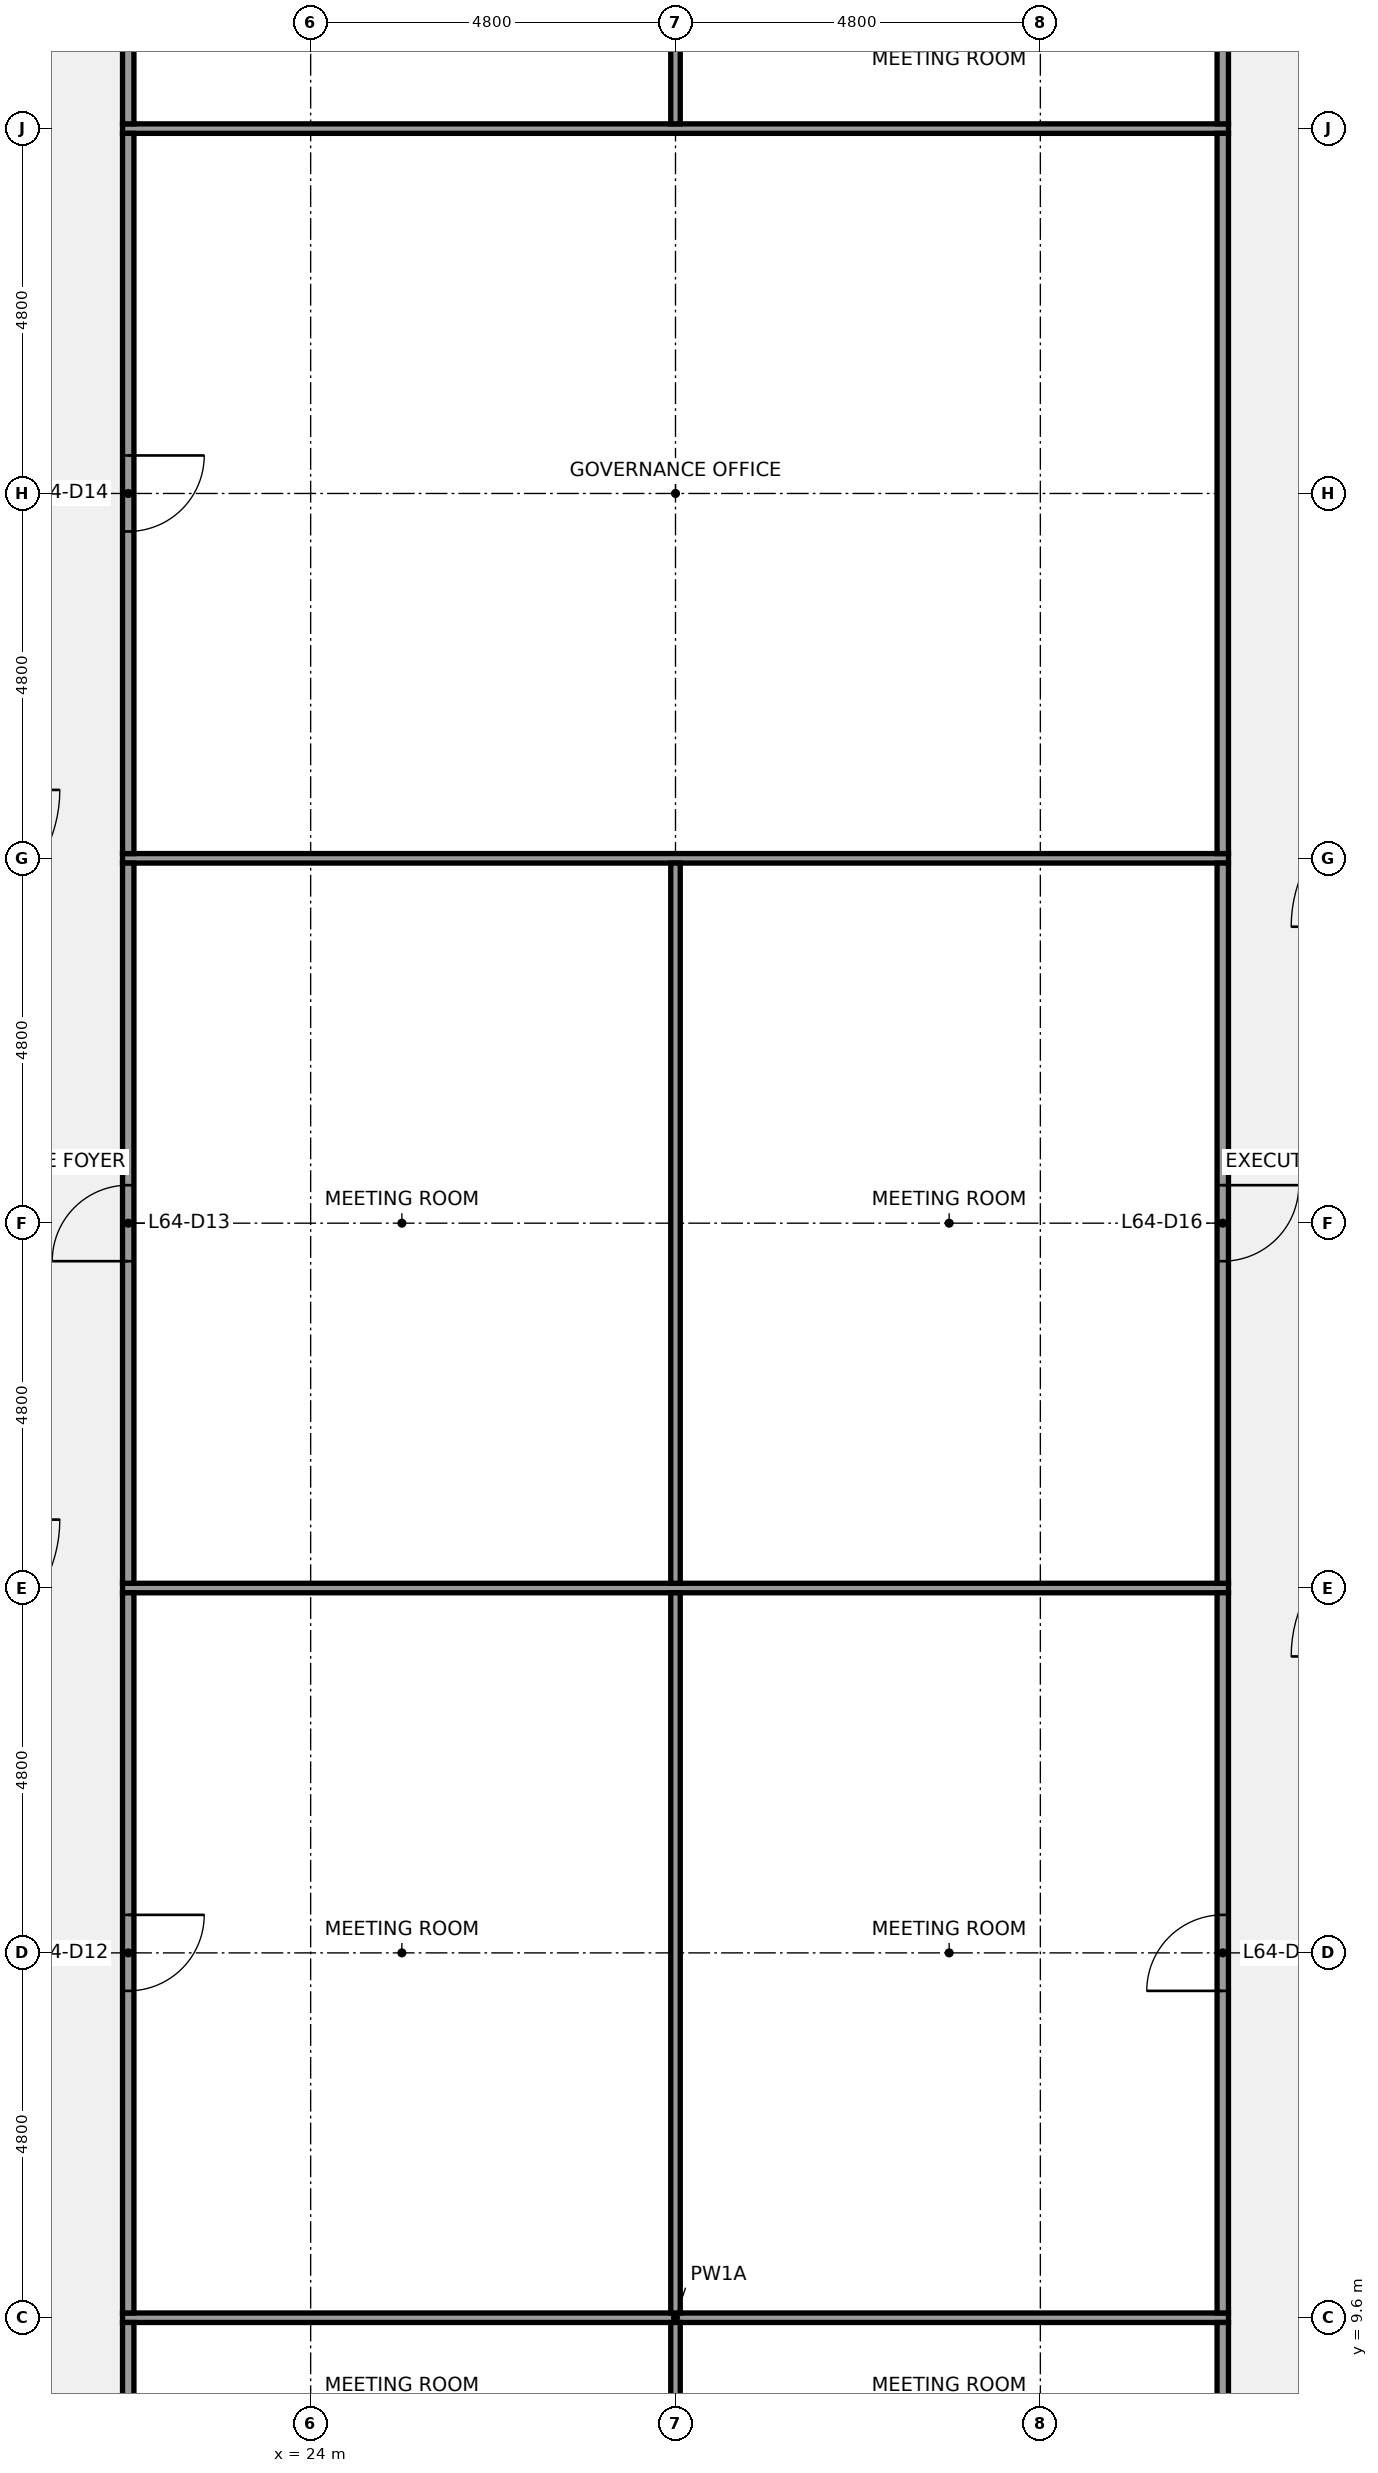
"""IFC4 building model, lengths in metres.
Left out: names, types, materials, properties, quantities, classifications, styles, units other than length and angle.
Written with IfcOpenShell. Run it as: python <this file> out.ifc"""

import sys

from ifc_helpers import new_model, si_unit, direction, frame, frame_2d, origin, place, context, subcontext, project, spatial, rectangle, extrude, element, fill, save


model = new_model("IFC4")
c1 = context("Model", 3, precision=1e-05, world=origin(), true_north=direction((0.0, 1.0)))
c2 = subcontext(c1, "Body", "Model", "MODEL_VIEW")
j1 = project(units=[si_unit("LENGTHUNIT", "METRE"), si_unit("PLANEANGLEUNIT", "RADIAN")], contexts=[c1])
p1 = place(None, origin())
s1 = spatial("IfcSite", under=j1, at=p1, CompositionType="ELEMENT")
p2 = place(p1, origin())
s2 = spatial("IfcBuilding", under=s1, at=p2, CompositionType="ELEMENT")
p3 = place(p2, frame((0.0, 0.0, 294.3)))
s3 = spatial("IfcBuildingStorey", under=s2, at=p3, CompositionType="ELEMENT", Elevation=294.3)
for number, where, z_axis, x_axis in (
    (1, (21.525, 9.6, 0.0), (0.0, 0.0, 1.0), (1.0, 0.0, 0.0)),
    (2, (21.525, 19.2, 0.0), (0.0, 0.0, 1.0), (1.0, 0.0, 0.0)),
    (3, (21.525, 28.8, 0.0), (0.0, 0.0, 1.0), (1.0, 0.0, 0.0)),
    (4, (21.525, 38.4, 0.0), (0.0, 0.0, 1.0), (1.0, 0.0, 0.0)),
):
    element("IfcWall", number, at=place(p3, frame(where, z_axis=z_axis, x_axis=x_axis)), inside=s3, PredefinedType="PARTITIONING", context=c2, shape_type="SweptSolid", body=[
        extrude(rectangle(XDim=14.55, YDim=0.125, at=frame_2d((7.275, 0.0))), origin(), (0.0, 0.0, 1.0), 2.87),
    ])
p4 = place(p3, frame((21.6, 7.275, 0.0), z_axis=(0.0, 0.0, 1.0), x_axis=(0.0, 1.0, 0.0)))
e5 = element("IfcWall", 5, at=p4, inside=s3, PredefinedType="PARTITIONING", context=c2, shape_type="SweptSolid", body=[
    extrude(rectangle(XDim=2.263, YDim=0.15, at=frame_2d((1.131, 0.0))), origin(), (0.0, 0.0, 1.0), 2.87),
])
p5 = place(p3, frame((21.6, 9.663, 0.0), z_axis=(0.0, 0.0, 1.0), x_axis=(0.0, 1.0, 0.0)))
e6 = element("IfcWall", 6, at=p5, inside=s3, PredefinedType="PARTITIONING", context=c2, shape_type="SweptSolid", body=[
    extrude(rectangle(XDim=9.475, YDim=0.15, at=frame_2d((4.737, 0.0))), origin(), (0.0, 0.0, 1.0), 2.87),
])
p6 = place(p5, frame((4.238, 0.0, 0.0)))
e7 = element("IfcOpeningElement", 7, at=p6, cuts=e6, PredefinedType="OPENING", context=c2, shape_type="SweptSolid", body=[
    extrude(rectangle(XDim=1.0, YDim=2.1, at=frame_2d((0.5, 1.05))), frame((0.0, 0.085, 0.0), z_axis=(0.0, -1.0, 0.0), x_axis=(1.0, 0.0, 0.0)), (0.0, 0.0, 1.0), 0.17),
])
p7 = place(p3, frame((21.6, 19.262, 0.0), z_axis=(0.0, 0.0, 1.0), x_axis=(0.0, 1.0, 0.0)))
e8 = element("IfcWall", 8, at=p7, inside=s3, PredefinedType="PARTITIONING", context=c2, shape_type="SweptSolid", body=[
    extrude(rectangle(XDim=9.475, YDim=0.15, at=frame_2d((4.738, 0.0))), origin(), (0.0, 0.0, 1.0), 2.87),
])
p8 = place(p7, frame((4.238, 0.0, 0.0)))
e9 = element("IfcOpeningElement", 9, at=p8, cuts=e8, PredefinedType="OPENING", context=c2, shape_type="SweptSolid", body=[
    extrude(rectangle(XDim=1.0, YDim=2.1, at=frame_2d((0.5, 1.05))), frame((0.0, 0.085, 0.0), z_axis=(0.0, -1.0, 0.0), x_axis=(1.0, 0.0, 0.0)), (0.0, 0.0, 1.0), 0.17),
])
p9 = place(p3, frame((21.6, 28.863, 0.0), z_axis=(0.0, 0.0, 1.0), x_axis=(0.0, 1.0, 0.0)))
e10 = element("IfcWall", 10, at=p9, inside=s3, PredefinedType="PARTITIONING", context=c2, shape_type="SweptSolid", body=[
    extrude(rectangle(XDim=9.475, YDim=0.15, at=frame_2d((4.737, 0.0))), origin(), (0.0, 0.0, 1.0), 2.87),
])
p10 = place(p9, frame((4.238, 0.0, 0.0)))
e11 = element("IfcOpeningElement", 11, at=p10, cuts=e10, PredefinedType="OPENING", context=c2, shape_type="SweptSolid", body=[
    extrude(rectangle(XDim=1.0, YDim=2.1, at=frame_2d((0.5, 1.05))), frame((0.0, 0.085, 0.0), z_axis=(0.0, -1.0, 0.0), x_axis=(1.0, 0.0, 0.0)), (0.0, 0.0, 1.0), 0.17),
])
p11 = place(p3, frame((21.6, 38.462, 0.0), z_axis=(0.0, 0.0, 1.0), x_axis=(0.0, 1.0, 0.0)))
e12 = element("IfcWall", 12, at=p11, inside=s3, PredefinedType="PARTITIONING", context=c2, shape_type="SweptSolid", body=[
    extrude(rectangle(XDim=2.263, YDim=0.15, at=frame_2d((1.131, 0.0))), origin(), (0.0, 0.0, 1.0), 2.87),
])
p12 = place(p3, frame((28.8, 7.275, 0.0), z_axis=(0.0, 0.0, 1.0), x_axis=(0.0, 1.0, 0.0)))
e13 = element("IfcWall", 13, at=p12, inside=s3, PredefinedType="PARTITIONING", context=c2, shape_type="SweptSolid", body=[
    extrude(rectangle(XDim=2.263, YDim=0.125, at=frame_2d((1.131, 0.0))), origin(), (0.0, 0.0, 1.0), 2.87),
])
p13 = place(p3, frame((28.8, 9.663, 0.0), z_axis=(0.0, 0.0, 1.0), x_axis=(0.0, 1.0, 0.0)))
e14 = element("IfcWall", 14, at=p13, inside=s3, PredefinedType="PARTITIONING", context=c2, shape_type="SweptSolid", body=[
    extrude(rectangle(XDim=9.475, YDim=0.125, at=frame_2d((4.737, 0.0))), origin(), (0.0, 0.0, 1.0), 2.87),
])
p14 = place(p3, frame((28.8, 19.262, 0.0), z_axis=(0.0, 0.0, 1.0), x_axis=(0.0, 1.0, 0.0)))
e15 = element("IfcWall", 15, at=p14, inside=s3, PredefinedType="PARTITIONING", context=c2, shape_type="SweptSolid", body=[
    extrude(rectangle(XDim=9.475, YDim=0.125, at=frame_2d((4.738, 0.0))), origin(), (0.0, 0.0, 1.0), 2.87),
])
p15 = place(p3, frame((28.8, 38.462, 0.0), z_axis=(0.0, 0.0, 1.0), x_axis=(0.0, 1.0, 0.0)))
e16 = element("IfcWall", 16, at=p15, inside=s3, PredefinedType="PARTITIONING", context=c2, shape_type="SweptSolid", body=[
    extrude(rectangle(XDim=2.263, YDim=0.125, at=frame_2d((1.131, 0.0))), origin(), (0.0, 0.0, 1.0), 2.87),
])
p16 = place(p3, frame((36.0, 7.275, 0.0), z_axis=(0.0, 0.0, 1.0), x_axis=(0.0, 1.0, 0.0)))
e17 = element("IfcWall", 17, at=p16, inside=s3, PredefinedType="PARTITIONING", context=c2, shape_type="SweptSolid", body=[
    extrude(rectangle(XDim=2.263, YDim=0.15, at=frame_2d((1.131, 0.0))), origin(), (0.0, 0.0, 1.0), 2.87),
])
p17 = place(p3, frame((36.0, 9.663, 0.0), z_axis=(0.0, 0.0, 1.0), x_axis=(0.0, 1.0, 0.0)))
e18 = element("IfcWall", 18, at=p17, inside=s3, PredefinedType="PARTITIONING", context=c2, shape_type="SweptSolid", body=[
    extrude(rectangle(XDim=9.475, YDim=0.15, at=frame_2d((4.737, 0.0))), origin(), (0.0, 0.0, 1.0), 2.87),
])
p18 = place(p17, frame((4.238, 0.0, 0.0)))
e19 = element("IfcOpeningElement", 19, at=p18, cuts=e18, PredefinedType="OPENING", context=c2, shape_type="SweptSolid", body=[
    extrude(rectangle(XDim=1.0, YDim=2.1, at=frame_2d((0.5, 1.05))), frame((0.0, 0.085, 0.0), z_axis=(0.0, -1.0, 0.0), x_axis=(1.0, 0.0, 0.0)), (0.0, 0.0, 1.0), 0.17),
])
p19 = place(p3, frame((36.0, 19.262, 0.0), z_axis=(0.0, 0.0, 1.0), x_axis=(0.0, 1.0, 0.0)))
e20 = element("IfcWall", 20, at=p19, inside=s3, PredefinedType="PARTITIONING", context=c2, shape_type="SweptSolid", body=[
    extrude(rectangle(XDim=9.475, YDim=0.15, at=frame_2d((4.738, 0.0))), origin(), (0.0, 0.0, 1.0), 2.87),
])
p20 = place(p19, frame((4.238, 0.0, 0.0)))
e21 = element("IfcOpeningElement", 21, at=p20, cuts=e20, PredefinedType="OPENING", context=c2, shape_type="SweptSolid", body=[
    extrude(rectangle(XDim=1.0, YDim=2.1, at=frame_2d((0.5, 1.05))), frame((0.0, 0.085, 0.0), z_axis=(0.0, -1.0, 0.0), x_axis=(1.0, 0.0, 0.0)), (0.0, 0.0, 1.0), 0.17),
])
p21 = place(p3, frame((36.0, 28.863, 0.0), z_axis=(0.0, 0.0, 1.0), x_axis=(0.0, 1.0, 0.0)))
e22 = element("IfcWall", 22, at=p21, inside=s3, PredefinedType="PARTITIONING", context=c2, shape_type="SweptSolid", body=[
    extrude(rectangle(XDim=9.475, YDim=0.15, at=frame_2d((4.737, 0.0))), origin(), (0.0, 0.0, 1.0), 2.87),
])
p22 = place(p3, frame((36.0, 38.462, 0.0), z_axis=(0.0, 0.0, 1.0), x_axis=(0.0, 1.0, 0.0)))
e23 = element("IfcWall", 23, at=p22, inside=s3, PredefinedType="PARTITIONING", context=c2, shape_type="SweptSolid", body=[
    extrude(rectangle(XDim=2.263, YDim=0.15, at=frame_2d((1.131, 0.0))), origin(), (0.0, 0.0, 1.0), 2.87),
])
p23 = place(p6, origin())
e24 = element("IfcDoor", 24, at=p23, inside=s3, OperationType="SINGLE_SWING_RIGHT", PredefinedType="DOOR", context=c2, shape_type="SweptSolid", body=[
    extrude(rectangle(XDim=1.0, YDim=2.1, at=frame_2d((0.5, 1.05))), frame((0.0, 0.025, 0.0), z_axis=(0.0, -1.0, 0.0), x_axis=(1.0, 0.0, 0.0)), (0.0, 0.0, 1.0), 0.05),
])
fill(e7, e24)
p24 = place(p8, origin())
e25 = element("IfcDoor", 25, at=p24, inside=s3, OperationType="SINGLE_SWING_LEFT", PredefinedType="DOOR", context=c2, shape_type="SweptSolid", body=[
    extrude(rectangle(XDim=1.0, YDim=2.1, at=frame_2d((0.5, 1.05))), frame((0.0, 0.025, 0.0), z_axis=(0.0, -1.0, 0.0), x_axis=(1.0, 0.0, 0.0)), (0.0, 0.0, 1.0), 0.05),
])
fill(e9, e25)
p25 = place(p10, origin())
e26 = element("IfcDoor", 26, at=p25, inside=s3, OperationType="SINGLE_SWING_RIGHT", PredefinedType="DOOR", context=c2, shape_type="SweptSolid", body=[
    extrude(rectangle(XDim=1.0, YDim=2.1, at=frame_2d((0.5, 1.05))), frame((0.0, 0.025, 0.0), z_axis=(0.0, -1.0, 0.0), x_axis=(1.0, 0.0, 0.0)), (0.0, 0.0, 1.0), 0.05),
])
fill(e11, e26)
p26 = place(p18, origin())
e27 = element("IfcDoor", 27, at=p26, inside=s3, OperationType="SINGLE_SWING_LEFT", PredefinedType="DOOR", context=c2, shape_type="SweptSolid", body=[
    extrude(rectangle(XDim=1.0, YDim=2.1, at=frame_2d((0.5, 1.05))), frame((0.0, 0.025, 0.0), z_axis=(0.0, -1.0, 0.0), x_axis=(1.0, 0.0, 0.0)), (0.0, 0.0, 1.0), 0.05),
])
fill(e19, e27)
p27 = place(p20, origin())
e28 = element("IfcDoor", 28, at=p27, inside=s3, OperationType="SINGLE_SWING_RIGHT", PredefinedType="DOOR", context=c2, shape_type="SweptSolid", body=[
    extrude(rectangle(XDim=1.0, YDim=2.1, at=frame_2d((0.5, 1.05))), frame((0.0, 0.025, 0.0), z_axis=(0.0, -1.0, 0.0), x_axis=(1.0, 0.0, 0.0)), (0.0, 0.0, 1.0), 0.05),
])
fill(e21, e28)
save(model, sys.argv[1])
